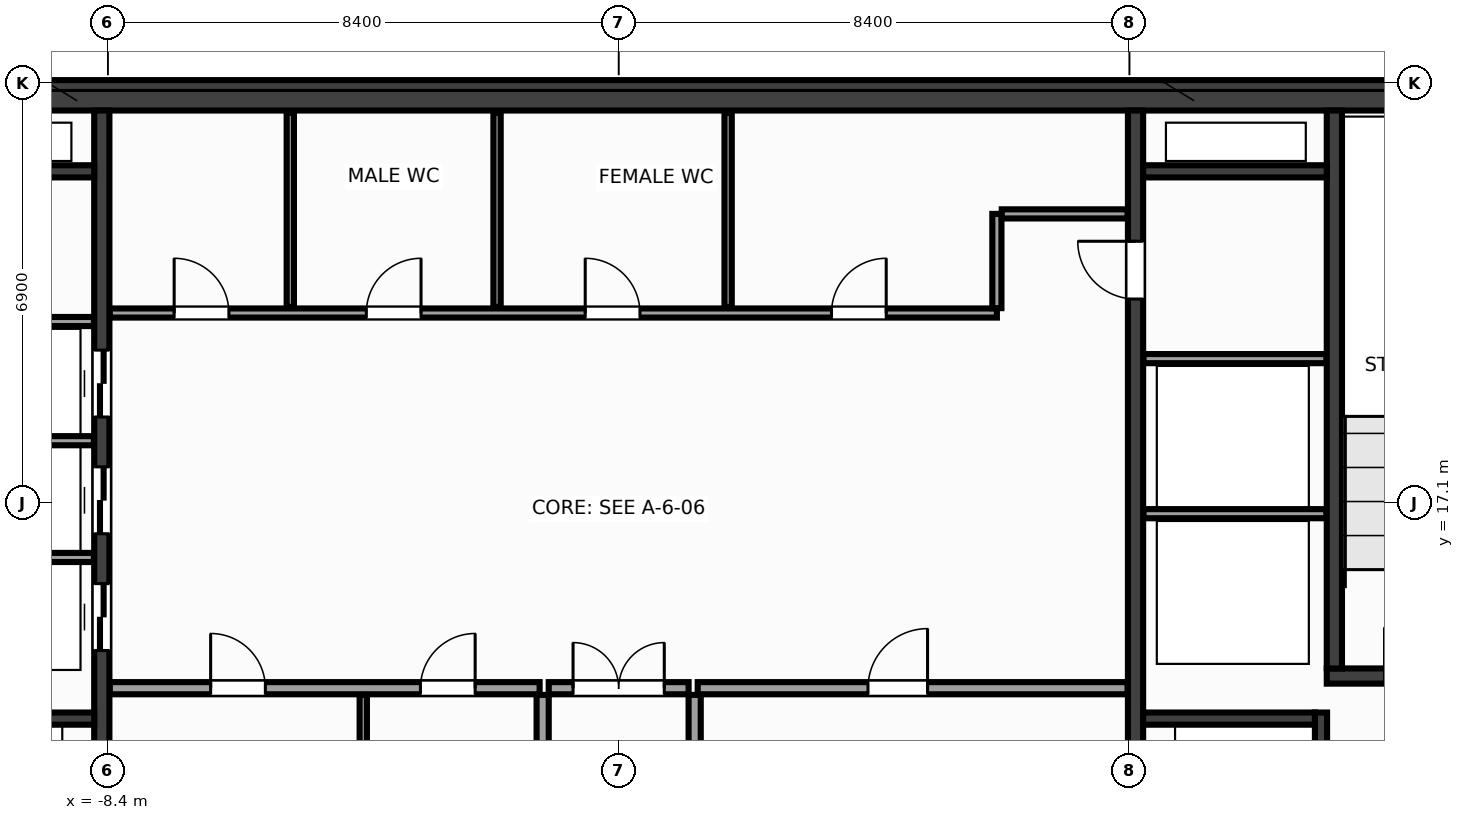
"""IFC4 building model, lengths in metres.
Left out: names, types, materials, properties, quantities, classifications, styles, units other than length and angle.
Written with IfcOpenShell. Run it as: python <this file> out.ifc"""

import sys

from ifc_helpers import new_model, si_unit, direction, frame, frame_2d, origin, place, context, subcontext, project, spatial, rectangle, extrude, source, transform, mapped, element, fill, save


model = new_model("IFC4")
c1 = context("Model", 3, precision=1e-05, world=origin(), true_north=direction((0.0, 1.0)))
c2 = subcontext(c1, "Body", "Model", "MODEL_VIEW")
j1 = project(units=[si_unit("LENGTHUNIT", "METRE"), si_unit("PLANEANGLEUNIT", "RADIAN")], contexts=[c1])
p1 = place(None, origin())
s1 = spatial("IfcSite", under=j1, at=p1, CompositionType="ELEMENT")
p2 = place(p1, origin())
s2 = spatial("IfcBuilding", under=s1, at=p2, CompositionType="ELEMENT")
p3 = place(p2, frame((0.0, 0.0, 207.2)))
s3 = spatial("IfcBuildingStorey", under=s2, at=p3, CompositionType="ELEMENT", Elevation=207.2)
m1 = source(origin(), c2, "Body", "SweptSolid", [
    extrude(rectangle(XDim=31.7, YDim=0.5, at=frame_2d((15.85, 0.0))), origin(), (0.0, 0.0, 1.0), 3.6),
])
p4 = place(p3, frame((-15.85, 23.8, 0.0), z_axis=(0.0, 0.0, 1.0), x_axis=(1.0, 0.0, 0.0)))
e1 = element("IfcWall", 1, at=p4, inside=s3, PredefinedType="SHEAR", context=c2, shape_type="MappedRepresentation", body=[
    mapped(m1, transform((0.0, 0.0, 0.0), x_axis=(1.0, 0.0, 0.0), y_axis=(0.0, 1.0, 0.0), z_axis=(0.0, 0.0, 1.0), scale=1.0)),
])
m2 = source(origin(), c2, "Body", "SweptSolid", [
    extrude(rectangle(XDim=13.1, YDim=0.25, at=frame_2d((6.55, 0.0))), origin(), (0.0, 0.0, 1.0), 3.6),
])
p5 = place(p3, frame((-8.5, 10.45, 0.0), z_axis=(0.0, 0.0, 1.0), x_axis=(0.0, 1.0, 0.0)))
e2 = element("IfcWall", 2, at=p5, inside=s3, PredefinedType="SHEAR", context=c2, shape_type="MappedRepresentation", body=[
    mapped(m2, transform((0.0, 0.0, 0.0), x_axis=(1.0, 0.0, 0.0), y_axis=(0.0, 1.0, 0.0), z_axis=(0.0, 0.0, 1.0), scale=1.0)),
])
p6 = place(p5, frame((4.22, 0.0, 0.0)))
e3 = element("IfcOpeningElement", 3, at=p6, cuts=e2, PredefinedType="OPENING", context=c2, shape_type="SweptSolid", body=[
    extrude(rectangle(XDim=1.1, YDim=2.15, at=frame_2d((0.55, 1.075))), frame((0.0, 0.137, 0.0), z_axis=(0.0, -1.0, 0.0), x_axis=(1.0, 0.0, 0.0)), (0.0, 0.0, 1.0), 0.274),
])
p7 = place(p5, frame((6.14, 0.0, 0.0)))
e4 = element("IfcOpeningElement", 4, at=p7, cuts=e2, PredefinedType="OPENING", context=c2, shape_type="SweptSolid", body=[
    extrude(rectangle(XDim=1.1, YDim=2.15, at=frame_2d((0.55, 1.075))), frame((0.0, 0.137, 0.0), z_axis=(0.0, -1.0, 0.0), x_axis=(1.0, 0.0, 0.0)), (0.0, 0.0, 1.0), 0.274),
])
p8 = place(p5, frame((8.06, 0.0, 0.0)))
e5 = element("IfcOpeningElement", 5, at=p8, cuts=e2, PredefinedType="OPENING", context=c2, shape_type="SweptSolid", body=[
    extrude(rectangle(XDim=1.1, YDim=2.15, at=frame_2d((0.55, 1.075))), frame((0.0, 0.137, 0.0), z_axis=(0.0, -1.0, 0.0), x_axis=(1.0, 0.0, 0.0)), (0.0, 0.0, 1.0), 0.274),
])
p9 = place(p3, frame((8.5, 10.45, 0.0), z_axis=(0.0, 0.0, 1.0), x_axis=(0.0, 1.0, 0.0)))
e6 = element("IfcWall", 6, at=p9, inside=s3, PredefinedType="SHEAR", context=c2, shape_type="MappedRepresentation", body=[
    mapped(m2, transform((0.0, 0.0, 0.0), x_axis=(1.0, 0.0, 0.0), y_axis=(0.0, 1.0, 0.0), z_axis=(0.0, 0.0, 1.0), scale=1.0)),
])
p10 = place(p9, frame((10.0, 0.0, 0.0)))
e7 = element("IfcOpeningElement", 7, at=p10, cuts=e6, PredefinedType="OPENING", context=c2, shape_type="SweptSolid", body=[
    extrude(rectangle(XDim=0.95, YDim=2.15, at=frame_2d((0.475, 1.075))), frame((0.0, 0.137, 0.0), z_axis=(0.0, -1.0, 0.0), x_axis=(1.0, 0.0, 0.0)), (0.0, 0.0, 1.0), 0.274),
])
m3 = source(origin(), c2, "Body", "SweptSolid", [
    extrude(rectangle(XDim=3.705, YDim=0.25, at=frame_2d((1.853, 0.0))), origin(), (0.0, 0.0, 1.0), 3.6),
])
p11 = place(p3, frame((11.645, 14.25, 0.0), z_axis=(0.0, 0.0, 1.0), x_axis=(1.0, 0.0, 0.0)))
e8 = element("IfcWall", 8, at=p11, inside=s3, PredefinedType="SHEAR", context=c2, shape_type="MappedRepresentation", body=[
    mapped(m3, transform((0.0, 0.0, 0.0), x_axis=(1.0, 0.0, 0.0), y_axis=(0.0, 1.0, 0.0), z_axis=(0.0, 0.0, 1.0), scale=1.0)),
])
p12 = place(p11, frame((0.95, 0.0, 0.0)))
e9 = element("IfcOpeningElement", 9, at=p12, cuts=e8, PredefinedType="OPENING", context=c2, shape_type="SweptSolid", body=[
    extrude(rectangle(XDim=1.6, YDim=2.15, at=frame_2d((0.8, 1.075))), frame((0.0, 0.137, 0.0), z_axis=(0.0, -1.0, 0.0), x_axis=(1.0, 0.0, 0.0)), (0.0, 0.0, 1.0), 0.274),
])
m4 = source(origin(), c2, "Body", "SweptSolid", [
    extrude(rectangle(XDim=9.175, YDim=0.25, at=frame_2d((4.587, 0.0))), origin(), (0.0, 0.0, 1.0), 3.6),
])
p13 = place(p3, frame((11.77, 14.375, 0.0), z_axis=(0.0, 0.0, 1.0), x_axis=(0.0, 1.0, 0.0)))
e10 = element("IfcWall", 10, at=p13, inside=s3, PredefinedType="SHEAR", context=c2, shape_type="MappedRepresentation", body=[
    mapped(m4, transform((0.0, 0.0, 0.0), x_axis=(1.0, 0.0, 0.0), y_axis=(0.0, 1.0, 0.0), z_axis=(0.0, 0.0, 1.0), scale=1.0)),
])
m5 = source(origin(), c2, "Body", "SweptSolid", [
    extrude(rectangle(XDim=2.825, YDim=0.2, at=frame_2d((1.413, 0.0))), origin(), (0.0, 0.0, 1.0), 3.6),
])
p14 = place(p3, frame((-11.45, 13.55, 0.0), z_axis=(0.0, 0.0, 1.0), x_axis=(1.0, 0.0, 0.0)))
e11 = element("IfcWall", 11, at=p14, inside=s3, PredefinedType="SHEAR", context=c2, shape_type="MappedRepresentation", body=[
    mapped(m5, transform((0.0, 0.0, 0.0), x_axis=(1.0, 0.0, 0.0), y_axis=(0.0, 1.0, 0.0), z_axis=(0.0, 0.0, 1.0), scale=1.0)),
])
m6 = source(origin(), c2, "Body", "SweptSolid", [
    extrude(rectangle(XDim=3.2, YDim=0.2, at=frame_2d((1.6, 0.0))), origin(), (0.0, 0.0, 1.0), 3.6),
])
p15 = place(p3, frame((11.55, 10.45, 0.0), z_axis=(0.0, 0.0, 1.0), x_axis=(0.0, 1.0, 0.0)))
e12 = element("IfcWall", 12, at=p15, inside=s3, PredefinedType="SHEAR", context=c2, shape_type="MappedRepresentation", body=[
    mapped(m6, transform((0.0, 0.0, 0.0), x_axis=(1.0, 0.0, 0.0), y_axis=(0.0, 1.0, 0.0), z_axis=(0.0, 0.0, 1.0), scale=1.0)),
])
p16 = place(p15, frame((0.9, 0.0, 0.0)))
e13 = element("IfcOpeningElement", 13, at=p16, cuts=e12, PredefinedType="OPENING", context=c2, shape_type="SweptSolid", body=[
    extrude(rectangle(XDim=1.1, YDim=2.15, at=frame_2d((0.55, 1.075))), frame((0.0, 0.112, 0.0), z_axis=(0.0, -1.0, 0.0), x_axis=(1.0, 0.0, 0.0)), (0.0, 0.0, 1.0), 0.224),
])
p17 = place(p3, frame((8.625, 13.55, 0.0), z_axis=(0.0, 0.0, 1.0), x_axis=(1.0, 0.0, 0.0)))
e14 = element("IfcWall", 14, at=p17, inside=s3, PredefinedType="SHEAR", context=c2, shape_type="MappedRepresentation", body=[
    mapped(m5, transform((0.0, 0.0, 0.0), x_axis=(1.0, 0.0, 0.0), y_axis=(0.0, 1.0, 0.0), z_axis=(0.0, 0.0, 1.0), scale=1.0)),
])
m7 = source(origin(), c2, "Body", "SweptSolid", [
    extrude(rectangle(XDim=3.02, YDim=0.2, at=frame_2d((1.51, 0.0))), origin(), (0.0, 0.0, 1.0), 3.6),
])
for number, where, z_axis, x_axis in (
    (15, (-11.645, 22.55, 0.0), (0.0, 0.0, 1.0), (1.0, 0.0, 0.0)),
    (16, (8.625, 22.55, 0.0), (0.0, 0.0, 1.0), (1.0, 0.0, 0.0)),
):
    element("IfcWall", number, at=place(p3, frame(where, z_axis=z_axis, x_axis=x_axis)), inside=s3, PredefinedType="SHEAR", context=c2, shape_type="MappedRepresentation", body=[
        mapped(m7, transform((0.0, 0.0, 0.0), x_axis=(1.0, 0.0, 0.0), y_axis=(0.0, 1.0, 0.0), z_axis=(0.0, 0.0, 1.0), scale=1.0)),
    ])
m8 = source(origin(), c2, "Body", "SweptSolid", [
    extrude(rectangle(XDim=3.01, YDim=0.15, at=frame_2d((1.505, 0.0))), origin(), (0.0, 0.0, 1.0), 3.38),
])
for number, where, z_axis, x_axis in (
    (17, (-11.64, 16.2, 0.0), (0.0, 0.0, 1.0), (1.0, 0.0, 0.0)),
    (18, (-11.64, 18.12, 0.0), (0.0, 0.0, 1.0), (1.0, 0.0, 0.0)),
    (19, (-11.64, 20.08, 0.0), (0.0, 0.0, 1.0), (1.0, 0.0, 0.0)),
    (20, (8.63, 16.92, 0.0), (0.0, 0.0, 1.0), (1.0, 0.0, 0.0)),
    (21, (8.63, 19.47, 0.0), (0.0, 0.0, 1.0), (1.0, 0.0, 0.0)),
):
    element("IfcWall", number, at=place(p3, frame(where, z_axis=z_axis, x_axis=x_axis)), inside=s3, PredefinedType="PARTITIONING", context=c2, shape_type="MappedRepresentation", body=[
        mapped(m8, transform((0.0, 0.0, 0.0), x_axis=(1.0, 0.0, 0.0), y_axis=(0.0, 1.0, 0.0), z_axis=(0.0, 0.0, 1.0), scale=1.0)),
    ])
m9 = source(origin(), c2, "Body", "SweptSolid", [
    extrude(rectangle(XDim=7.07, YDim=0.2, at=frame_2d((3.535, 0.0))), origin(), (0.0, 0.0, 1.0), 3.38),
])
p18 = place(p3, frame((-8.37, 14.05, 0.0), z_axis=(0.0, 0.0, 1.0), x_axis=(1.0, 0.0, 0.0)))
e22 = element("IfcWall", 22, at=p18, inside=s3, PredefinedType="PARTITIONING", context=c2, shape_type="MappedRepresentation", body=[
    mapped(m9, transform((0.0, 0.0, 0.0), x_axis=(1.0, 0.0, 0.0), y_axis=(0.0, 1.0, 0.0), z_axis=(0.0, 0.0, 1.0), scale=1.0)),
])
p19 = place(p18, frame((1.66, 0.0, 0.0)))
e23 = element("IfcOpeningElement", 23, at=p19, cuts=e22, PredefinedType="OPENING", context=c2, shape_type="SweptSolid", body=[
    extrude(rectangle(XDim=0.9, YDim=2.15, at=frame_2d((0.45, 1.075))), frame((0.0, 0.112, 0.0), z_axis=(0.0, -1.0, 0.0), x_axis=(1.0, 0.0, 0.0)), (0.0, 0.0, 1.0), 0.224),
])
p20 = place(p18, frame((5.11, 0.0, 0.0)))
e24 = element("IfcOpeningElement", 24, at=p20, cuts=e22, PredefinedType="OPENING", context=c2, shape_type="SweptSolid", body=[
    extrude(rectangle(XDim=0.9, YDim=2.15, at=frame_2d((0.45, 1.075))), frame((0.0, 0.112, 0.0), z_axis=(0.0, -1.0, 0.0), x_axis=(1.0, 0.0, 0.0)), (0.0, 0.0, 1.0), 0.224),
])
p21 = place(p3, frame((1.3, 14.05, 0.0), z_axis=(0.0, 0.0, 1.0), x_axis=(1.0, 0.0, 0.0)))
e25 = element("IfcWall", 25, at=p21, inside=s3, PredefinedType="PARTITIONING", context=c2, shape_type="MappedRepresentation", body=[
    mapped(m9, transform((0.0, 0.0, 0.0), x_axis=(1.0, 0.0, 0.0), y_axis=(0.0, 1.0, 0.0), z_axis=(0.0, 0.0, 1.0), scale=1.0)),
])
p22 = place(p21, frame((2.8, 0.0, 0.0)))
e26 = element("IfcOpeningElement", 26, at=p22, cuts=e25, PredefinedType="OPENING", context=c2, shape_type="SweptSolid", body=[
    extrude(rectangle(XDim=0.98, YDim=2.15, at=frame_2d((0.49, 1.075))), frame((0.0, 0.112, 0.0), z_axis=(0.0, -1.0, 0.0), x_axis=(1.0, 0.0, 0.0)), (0.0, 0.0, 1.0), 0.224),
])
m10 = source(origin(), c2, "Body", "SweptSolid", [
    extrude(rectangle(XDim=3.49, YDim=0.2, at=frame_2d((1.745, 0.0))), origin(), (0.0, 0.0, 1.0), 3.38),
])
for number, where, z_axis, x_axis in (
    (27, (-1.25, 10.45, 0.0), (0.0, 0.0, 1.0), (0.0, 1.0, 0.0)),
    (28, (1.25, 10.45, 0.0), (0.0, 0.0, 1.0), (0.0, 1.0, 0.0)),
):
    element("IfcWall", number, at=place(p3, frame(where, z_axis=z_axis, x_axis=x_axis)), inside=s3, PredefinedType="PARTITIONING", context=c2, shape_type="MappedRepresentation", body=[
        mapped(m10, transform((0.0, 0.0, 0.0), x_axis=(1.0, 0.0, 0.0), y_axis=(0.0, 1.0, 0.0), z_axis=(0.0, 0.0, 1.0), scale=1.0)),
    ])
m11 = source(origin(), c2, "Body", "SweptSolid", [
    extrude(rectangle(XDim=2.3, YDim=0.2, at=frame_2d((1.15, 0.0))), origin(), (0.0, 0.0, 1.0), 3.38),
])
p23 = place(p3, frame((-1.15, 14.05, 0.0), z_axis=(0.0, 0.0, 1.0), x_axis=(1.0, 0.0, 0.0)))
e29 = element("IfcWall", 29, at=p23, inside=s3, PredefinedType="PARTITIONING", context=c2, shape_type="MappedRepresentation", body=[
    mapped(m11, transform((0.0, 0.0, 0.0), x_axis=(1.0, 0.0, 0.0), y_axis=(0.0, 1.0, 0.0), z_axis=(0.0, 0.0, 1.0), scale=1.0)),
])
p24 = place(p23, frame((0.4, 0.0, 0.0)))
e30 = element("IfcOpeningElement", 30, at=p24, cuts=e29, PredefinedType="OPENING", context=c2, shape_type="SweptSolid", body=[
    extrude(rectangle(XDim=1.5, YDim=2.2, at=frame_2d((0.75, 1.1))), frame((0.0, 0.112, 0.0), z_axis=(0.0, -1.0, 0.0), x_axis=(1.0, 0.0, 0.0)), (0.0, 0.0, 1.0), 0.224),
])
m12 = source(origin(), c2, "Body", "SweptSolid", [
    extrude(rectangle(XDim=14.59, YDim=0.15, at=frame_2d((7.295, 0.0))), origin(), (0.0, 0.0, 1.0), 3.38),
])
p25 = place(p3, frame((-8.37, 20.22, 0.0), z_axis=(0.0, 0.0, 1.0), x_axis=(1.0, 0.0, 0.0)))
e31 = element("IfcWall", 31, at=p25, inside=s3, PredefinedType="PARTITIONING", context=c2, shape_type="MappedRepresentation", body=[
    mapped(m12, transform((0.0, 0.0, 0.0), x_axis=(1.0, 0.0, 0.0), y_axis=(0.0, 1.0, 0.0), z_axis=(0.0, 0.0, 1.0), scale=1.0)),
])
p26 = place(p25, frame((1.06, 0.0, 0.0)))
e32 = element("IfcOpeningElement", 32, at=p26, cuts=e31, PredefinedType="OPENING", context=c2, shape_type="SweptSolid", body=[
    extrude(rectangle(XDim=0.9, YDim=2.15, at=frame_2d((0.45, 1.075))), frame((0.0, 0.087, 0.0), z_axis=(0.0, -1.0, 0.0), x_axis=(1.0, 0.0, 0.0)), (0.0, 0.0, 1.0), 0.174),
])
p27 = place(p25, frame((4.22, 0.0, 0.0)))
e33 = element("IfcOpeningElement", 33, at=p27, cuts=e31, PredefinedType="OPENING", context=c2, shape_type="SweptSolid", body=[
    extrude(rectangle(XDim=0.9, YDim=2.15, at=frame_2d((0.45, 1.075))), frame((0.0, 0.087, 0.0), z_axis=(0.0, -1.0, 0.0), x_axis=(1.0, 0.0, 0.0)), (0.0, 0.0, 1.0), 0.174),
])
p28 = place(p25, frame((7.82, 0.0, 0.0)))
e34 = element("IfcOpeningElement", 34, at=p28, cuts=e31, PredefinedType="OPENING", context=c2, shape_type="SweptSolid", body=[
    extrude(rectangle(XDim=0.9, YDim=2.15, at=frame_2d((0.45, 1.075))), frame((0.0, 0.087, 0.0), z_axis=(0.0, -1.0, 0.0), x_axis=(1.0, 0.0, 0.0)), (0.0, 0.0, 1.0), 0.174),
])
p29 = place(p25, frame((11.87, 0.0, 0.0)))
e35 = element("IfcOpeningElement", 35, at=p29, cuts=e31, PredefinedType="OPENING", context=c2, shape_type="SweptSolid", body=[
    extrude(rectangle(XDim=0.9, YDim=2.15, at=frame_2d((0.45, 1.075))), frame((0.0, 0.087, 0.0), z_axis=(0.0, -1.0, 0.0), x_axis=(1.0, 0.0, 0.0)), (0.0, 0.0, 1.0), 0.174),
])
m13 = source(origin(), c2, "Body", "SweptSolid", [
    extrude(rectangle(XDim=1.55, YDim=0.15, at=frame_2d((0.775, 0.0))), origin(), (0.0, 0.0, 1.0), 3.38),
])
p30 = place(p3, frame((6.22, 20.3, 0.0), z_axis=(0.0, 0.0, 1.0), x_axis=(0.0, 1.0, 0.0)))
e36 = element("IfcWall", 36, at=p30, inside=s3, PredefinedType="PARTITIONING", context=c2, shape_type="MappedRepresentation", body=[
    mapped(m13, transform((0.0, 0.0, 0.0), x_axis=(1.0, 0.0, 0.0), y_axis=(0.0, 1.0, 0.0), z_axis=(0.0, 0.0, 1.0), scale=1.0)),
])
m14 = source(origin(), c2, "Body", "SweptSolid", [
    extrude(rectangle(XDim=2.07, YDim=0.15, at=frame_2d((1.035, 0.0))), origin(), (0.0, 0.0, 1.0), 3.38),
])
p31 = place(p3, frame((6.3, 21.85, 0.0), z_axis=(0.0, 0.0, 1.0), x_axis=(1.0, 0.0, 0.0)))
e37 = element("IfcWall", 37, at=p31, inside=s3, PredefinedType="PARTITIONING", context=c2, shape_type="MappedRepresentation", body=[
    mapped(m14, transform((0.0, 0.0, 0.0), x_axis=(1.0, 0.0, 0.0), y_axis=(0.0, 1.0, 0.0), z_axis=(0.0, 0.0, 1.0), scale=1.0)),
])
m15 = source(origin(), c2, "Body", "SweptSolid", [
    extrude(rectangle(XDim=3.49, YDim=0.12, at=frame_2d((1.745, 0.0))), origin(), (0.0, 0.0, 1.0), 3.38),
])
p32 = place(p3, frame((-4.2, 10.45, 0.0), z_axis=(0.0, 0.0, 1.0), x_axis=(0.0, 1.0, 0.0)))
e38 = element("IfcWall", 38, at=p32, inside=s3, PredefinedType="PARTITIONING", context=c2, shape_type="MappedRepresentation", body=[
    mapped(m15, transform((0.0, 0.0, 0.0), x_axis=(1.0, 0.0, 0.0), y_axis=(0.0, 1.0, 0.0), z_axis=(0.0, 0.0, 1.0), scale=1.0)),
])
m16 = source(origin(), c2, "Body", "SweptSolid", [
    extrude(rectangle(XDim=3.19, YDim=0.12, at=frame_2d((1.595, 0.0))), origin(), (0.0, 0.0, 1.0), 3.38),
])
for number, where, z_axis, x_axis in (
    (39, (-5.4, 20.32, 0.0), (0.0, 0.0, 1.0), (0.0, 1.0, 0.0)),
    (40, (-2.0, 20.32, 0.0), (0.0, 0.0, 1.0), (0.0, 1.0, 0.0)),
    (41, (1.8, 20.32, 0.0), (0.0, 0.0, 1.0), (0.0, 1.0, 0.0)),
):
    element("IfcWall", number, at=place(p3, frame(where, z_axis=z_axis, x_axis=x_axis)), inside=s3, PredefinedType="PARTITIONING", context=c2, shape_type="MappedRepresentation", body=[
        mapped(m16, transform((0.0, 0.0, 0.0), x_axis=(1.0, 0.0, 0.0), y_axis=(0.0, 1.0, 0.0), z_axis=(0.0, 0.0, 1.0), scale=1.0)),
    ])
m17 = source(origin(), c2, "Body", "SweptSolid", [
    extrude(rectangle(XDim=1.1, YDim=2.15, at=frame_2d((0.55, 1.075))), frame((0.0, 0.025, 0.0), z_axis=(0.0, -1.0, 0.0), x_axis=(1.0, 0.0, 0.0)), (0.0, 0.0, 1.0), 0.05),
])
p33 = place(p6, origin())
e42 = element("IfcDoor", 42, at=p33, inside=s3, OperationType="DOUBLE_DOOR_SLIDING", PredefinedType="DOOR", context=c2, shape_type="MappedRepresentation", body=[
    mapped(m17, transform((0.0, 0.0, 0.0), x_axis=(1.0, 0.0, 0.0), y_axis=(0.0, 1.0, 0.0), z_axis=(0.0, 0.0, 1.0), scale=1.0)),
])
fill(e3, e42)
p34 = place(p7, origin())
e43 = element("IfcDoor", 43, at=p34, inside=s3, OperationType="DOUBLE_DOOR_SLIDING", PredefinedType="DOOR", context=c2, shape_type="MappedRepresentation", body=[
    mapped(m17, transform((0.0, 0.0, 0.0), x_axis=(1.0, 0.0, 0.0), y_axis=(0.0, 1.0, 0.0), z_axis=(0.0, 0.0, 1.0), scale=1.0)),
])
fill(e4, e43)
p35 = place(p8, origin())
e44 = element("IfcDoor", 44, at=p35, inside=s3, OperationType="DOUBLE_DOOR_SLIDING", PredefinedType="DOOR", context=c2, shape_type="MappedRepresentation", body=[
    mapped(m17, transform((0.0, 0.0, 0.0), x_axis=(1.0, 0.0, 0.0), y_axis=(0.0, 1.0, 0.0), z_axis=(0.0, 0.0, 1.0), scale=1.0)),
])
fill(e5, e44)
m18 = source(origin(), c2, "Body", "SweptSolid", [
    extrude(rectangle(XDim=0.95, YDim=2.15, at=frame_2d((0.475, 1.075))), frame((0.0, 0.025, 0.0), z_axis=(0.0, -1.0, 0.0), x_axis=(1.0, 0.0, 0.0)), (0.0, 0.0, 1.0), 0.05),
])
p36 = place(p10, origin())
e45 = element("IfcDoor", 45, at=p36, inside=s3, OperationType="SINGLE_SWING_RIGHT", PredefinedType="DOOR", context=c2, shape_type="MappedRepresentation", body=[
    mapped(m18, transform((0.0, 0.0, 0.0), x_axis=(1.0, 0.0, 0.0), y_axis=(0.0, 1.0, 0.0), z_axis=(0.0, 0.0, 1.0), scale=1.0)),
])
fill(e7, e45)
m19 = source(origin(), c2, "Body", "SweptSolid", [
    extrude(rectangle(XDim=0.9, YDim=2.15, at=frame_2d((0.45, 1.075))), frame((0.0, 0.025, 0.0), z_axis=(0.0, -1.0, 0.0), x_axis=(1.0, 0.0, 0.0)), (0.0, 0.0, 1.0), 0.05),
])
p37 = place(p19, origin())
e46 = element("IfcDoor", 46, at=p37, inside=s3, OperationType="SINGLE_SWING_LEFT", PredefinedType="DOOR", context=c2, shape_type="MappedRepresentation", body=[
    mapped(m19, transform((0.0, 0.0, 0.0), x_axis=(1.0, 0.0, 0.0), y_axis=(0.0, 1.0, 0.0), z_axis=(0.0, 0.0, 1.0), scale=1.0)),
])
fill(e23, e46)
p38 = place(p20, origin())
e47 = element("IfcDoor", 47, at=p38, inside=s3, OperationType="SINGLE_SWING_RIGHT", PredefinedType="DOOR", context=c2, shape_type="MappedRepresentation", body=[
    mapped(m19, transform((0.0, 0.0, 0.0), x_axis=(1.0, 0.0, 0.0), y_axis=(0.0, 1.0, 0.0), z_axis=(0.0, 0.0, 1.0), scale=1.0)),
])
fill(e24, e47)
m20 = source(origin(), c2, "Body", "SweptSolid", [
    extrude(rectangle(XDim=0.98, YDim=2.15, at=frame_2d((0.49, 1.075))), frame((0.0, 0.025, 0.0), z_axis=(0.0, -1.0, 0.0), x_axis=(1.0, 0.0, 0.0)), (0.0, 0.0, 1.0), 0.05),
])
p39 = place(p22, origin())
e48 = element("IfcDoor", 48, at=p39, inside=s3, OperationType="SINGLE_SWING_RIGHT", PredefinedType="DOOR", context=c2, shape_type="MappedRepresentation", body=[
    mapped(m20, transform((0.0, 0.0, 0.0), x_axis=(1.0, 0.0, 0.0), y_axis=(0.0, 1.0, 0.0), z_axis=(0.0, 0.0, 1.0), scale=1.0)),
])
fill(e26, e48)
m21 = source(origin(), c2, "Body", "SweptSolid", [
    extrude(rectangle(XDim=1.5, YDim=2.2, at=frame_2d((0.75, 1.1))), frame((0.0, 0.025, 0.0), z_axis=(0.0, -1.0, 0.0), x_axis=(1.0, 0.0, 0.0)), (0.0, 0.0, 1.0), 0.05),
])
p40 = place(p24, origin())
e49 = element("IfcDoor", 49, at=p40, inside=s3, OperationType="DOUBLE_DOOR_SINGLE_SWING", PredefinedType="DOOR", context=c2, shape_type="MappedRepresentation", body=[
    mapped(m21, transform((0.0, 0.0, 0.0), x_axis=(1.0, 0.0, 0.0), y_axis=(0.0, 1.0, 0.0), z_axis=(0.0, 0.0, 1.0), scale=1.0)),
])
fill(e30, e49)
p41 = place(p26, origin())
e50 = element("IfcDoor", 50, at=p41, inside=s3, OperationType="SINGLE_SWING_LEFT", PredefinedType="DOOR", context=c2, shape_type="MappedRepresentation", body=[
    mapped(m19, transform((0.0, 0.0, 0.0), x_axis=(1.0, 0.0, 0.0), y_axis=(0.0, 1.0, 0.0), z_axis=(0.0, 0.0, 1.0), scale=1.0)),
])
fill(e32, e50)
p42 = place(p27, origin())
e51 = element("IfcDoor", 51, at=p42, inside=s3, OperationType="SINGLE_SWING_RIGHT", PredefinedType="DOOR", context=c2, shape_type="MappedRepresentation", body=[
    mapped(m19, transform((0.0, 0.0, 0.0), x_axis=(1.0, 0.0, 0.0), y_axis=(0.0, 1.0, 0.0), z_axis=(0.0, 0.0, 1.0), scale=1.0)),
])
fill(e33, e51)
p43 = place(p28, origin())
e52 = element("IfcDoor", 52, at=p43, inside=s3, OperationType="SINGLE_SWING_LEFT", PredefinedType="DOOR", context=c2, shape_type="MappedRepresentation", body=[
    mapped(m19, transform((0.0, 0.0, 0.0), x_axis=(1.0, 0.0, 0.0), y_axis=(0.0, 1.0, 0.0), z_axis=(0.0, 0.0, 1.0), scale=1.0)),
])
fill(e34, e52)
p44 = place(p29, origin())
e53 = element("IfcDoor", 53, at=p44, inside=s3, OperationType="SINGLE_SWING_RIGHT", PredefinedType="DOOR", context=c2, shape_type="MappedRepresentation", body=[
    mapped(m19, transform((0.0, 0.0, 0.0), x_axis=(1.0, 0.0, 0.0), y_axis=(0.0, 1.0, 0.0), z_axis=(0.0, 0.0, 1.0), scale=1.0)),
])
fill(e35, e53)
save(model, sys.argv[1])
